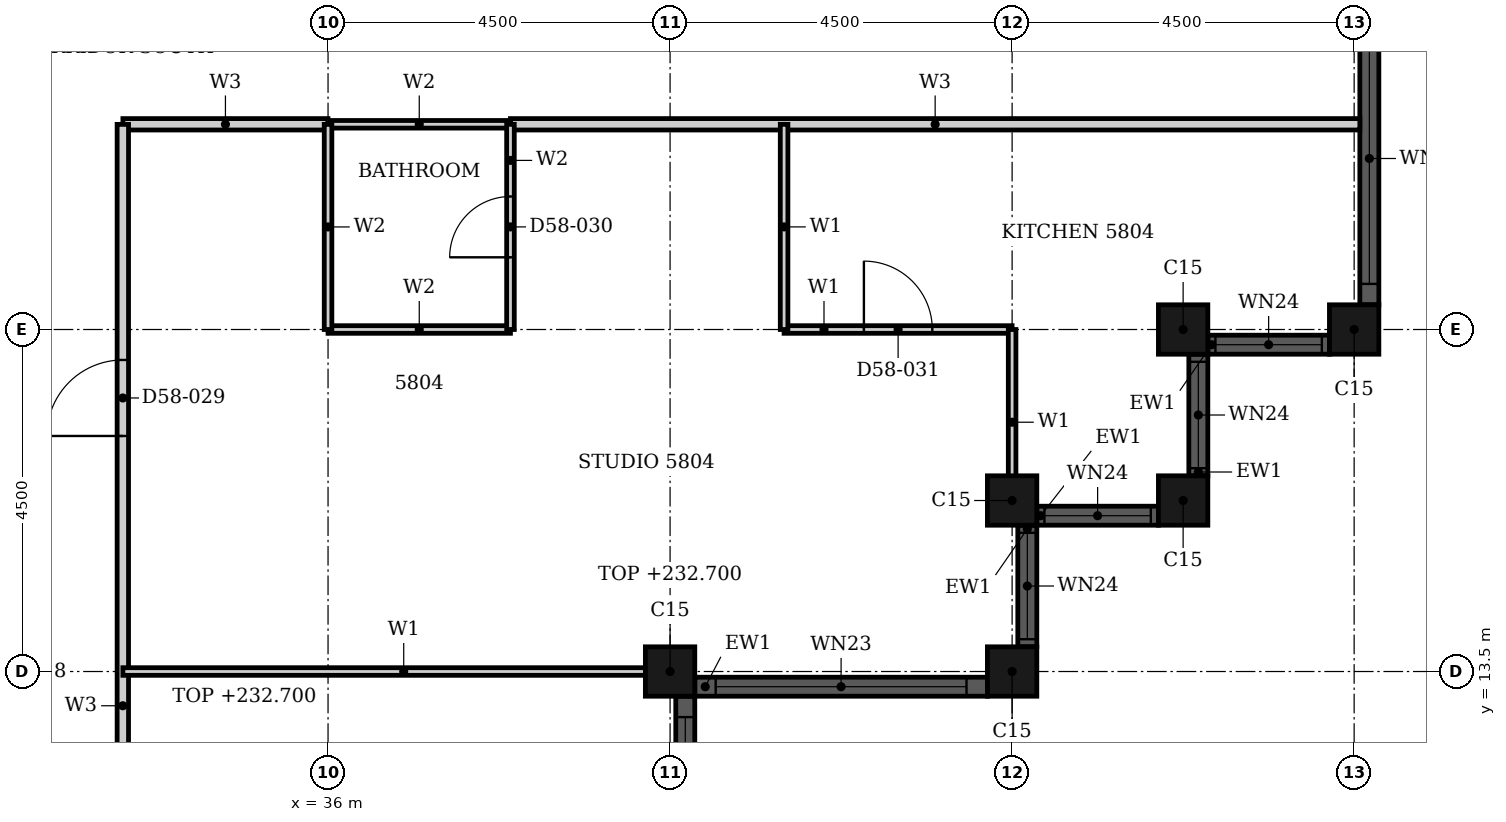
"""IFC4 building model, lengths in metres.
Left out: names, types, materials, properties, quantities, classifications, styles, units other than length and angle.
Written with IfcOpenShell. Run it as: python <this file> out.ifc"""

import sys

from ifc_helpers import new_model, si_unit, direction, frame, frame_2d, origin, origin_2d, place, context, subcontext, project, spatial, rectangle, hollow_rectangle, extrude, element, fill, save


model = new_model("IFC4")
c1 = context("Model", 3, precision=1e-05, world=origin(), true_north=direction((0.0, 1.0)))
c2 = subcontext(c1, "Body", "Model", "MODEL_VIEW")
j1 = project(units=[si_unit("LENGTHUNIT", "METRE"), si_unit("PLANEANGLEUNIT", "RADIAN")], contexts=[c1])
p1 = place(None, origin())
s1 = spatial("IfcSite", under=j1, at=p1, CompositionType="ELEMENT")
p2 = place(p1, origin())
s2 = spatial("IfcBuilding", under=s1, at=p2, CompositionType="ELEMENT")
p3 = place(p2, frame((0.0, 0.0, 229.4)))
s3 = spatial("IfcBuildingStorey", under=s2, at=p3, CompositionType="ELEMENT", Elevation=229.4)
p4 = place(p3, frame((40.5, 13.5, 0.0), z_axis=(0.0, 0.0, 1.0), x_axis=(1.0, 0.0, 0.0)))
e1 = element("IfcColumn", 1, at=p4, inside=s3, PredefinedType="COLUMN", context=c2, shape_type="SweptSolid", body=[
    extrude(hollow_rectangle(XDim=0.65, YDim=0.65, WallThickness=0.021, at=origin_2d()), origin(), (0.0, 0.0, 1.0), 3.3),
])
for number, where, z_axis, x_axis in (
    (2, (45.0, 13.5, 0.0), (0.0, 0.0, 1.0), (1.0, 0.0, 0.0)),
    (3, (45.0, 15.75, 0.0), (0.0, 0.0, 1.0), (1.0, 0.0, 0.0)),
    (4, (47.25, 15.75, 0.0), (0.0, 0.0, 1.0), (1.0, 0.0, 0.0)),
    (5, (47.25, 18.0, 0.0), (0.0, 0.0, 1.0), (1.0, 0.0, 0.0)),
    (6, (49.5, 18.0, 0.0), (0.0, 0.0, 1.0), (1.0, 0.0, 0.0)),
):
    element("IfcColumn", number, at=place(p3, frame(where, z_axis=z_axis, x_axis=x_axis)), inside=s3, PredefinedType="COLUMN", context=c2, shape_type="SweptSolid", body=[
        extrude(hollow_rectangle(XDim=0.65, YDim=0.65, WallThickness=0.021, at=origin_2d()), origin(), (0.0, 0.0, 1.0), 3.7),
    ])
p5 = place(p3, frame((40.825, 13.3, 0.0), z_axis=(0.0, 0.0, 1.0), x_axis=(1.0, 0.0, 0.0)))
e7 = element("IfcWall", 7, at=p5, inside=s3, PredefinedType="SOLIDWALL", context=c2, shape_type="SweptSolid", body=[
    extrude(rectangle(XDim=3.85, YDim=0.25, at=frame_2d((1.925, 0.0))), origin(), (0.0, 0.0, 1.0), 3.7),
])
p6 = place(p5, frame((0.275, 0.0, 0.45)))
e8 = element("IfcOpeningElement", 8, at=p6, cuts=e7, PredefinedType="OPENING", context=c2, shape_type="SweptSolid", body=[
    extrude(rectangle(XDim=3.3, YDim=1.9, at=frame_2d((1.65, 0.95))), frame((0.0, 0.135, 0.0), z_axis=(0.0, -1.0, 0.0), x_axis=(1.0, 0.0, 0.0)), (0.0, 0.0, 1.0), 0.27),
])
p7 = place(p3, frame((45.2, 13.825, 0.0), z_axis=(0.0, 0.0, 1.0), x_axis=(0.0, 1.0, 0.0)))
e9 = element("IfcWall", 9, at=p7, inside=s3, PredefinedType="SOLIDWALL", context=c2, shape_type="SweptSolid", body=[
    extrude(rectangle(XDim=1.6, YDim=0.25, at=frame_2d((0.8, 0.0))), origin(), (0.0, 0.0, 1.0), 3.7),
])
p8 = place(p7, frame((0.1, 0.0, 0.9)))
e10 = element("IfcOpeningElement", 10, at=p8, cuts=e9, PredefinedType="OPENING", context=c2, shape_type="SweptSolid", body=[
    extrude(rectangle(XDim=1.4, YDim=1.75, at=frame_2d((0.7, 0.875))), frame((0.0, 0.135, 0.0), z_axis=(0.0, -1.0, 0.0), x_axis=(1.0, 0.0, 0.0)), (0.0, 0.0, 1.0), 0.27),
])
p9 = place(p3, frame((45.325, 15.55, 0.0), z_axis=(0.0, 0.0, 1.0), x_axis=(1.0, 0.0, 0.0)))
e11 = element("IfcWall", 11, at=p9, inside=s3, PredefinedType="SOLIDWALL", context=c2, shape_type="SweptSolid", body=[
    extrude(rectangle(XDim=1.6, YDim=0.25, at=frame_2d((0.8, 0.0))), origin(), (0.0, 0.0, 1.0), 3.7),
])
p10 = place(p9, frame((0.1, 0.0, 0.9)))
e12 = element("IfcOpeningElement", 12, at=p10, cuts=e11, PredefinedType="OPENING", context=c2, shape_type="SweptSolid", body=[
    extrude(rectangle(XDim=1.4, YDim=1.75, at=frame_2d((0.7, 0.875))), frame((0.0, 0.135, 0.0), z_axis=(0.0, -1.0, 0.0), x_axis=(1.0, 0.0, 0.0)), (0.0, 0.0, 1.0), 0.27),
])
p11 = place(p3, frame((47.45, 16.075, 0.0), z_axis=(0.0, 0.0, 1.0), x_axis=(0.0, 1.0, 0.0)))
e13 = element("IfcWall", 13, at=p11, inside=s3, PredefinedType="SOLIDWALL", context=c2, shape_type="SweptSolid", body=[
    extrude(rectangle(XDim=1.6, YDim=0.25, at=frame_2d((0.8, 0.0))), origin(), (0.0, 0.0, 1.0), 3.7),
])
p12 = place(p11, frame((0.1, 0.0, 0.9)))
e14 = element("IfcOpeningElement", 14, at=p12, cuts=e13, PredefinedType="OPENING", context=c2, shape_type="SweptSolid", body=[
    extrude(rectangle(XDim=1.4, YDim=1.75, at=frame_2d((0.7, 0.875))), frame((0.0, 0.135, 0.0), z_axis=(0.0, -1.0, 0.0), x_axis=(1.0, 0.0, 0.0)), (0.0, 0.0, 1.0), 0.27),
])
p13 = place(p3, frame((47.575, 17.8, 0.0), z_axis=(0.0, 0.0, 1.0), x_axis=(1.0, 0.0, 0.0)))
e15 = element("IfcWall", 15, at=p13, inside=s3, PredefinedType="SOLIDWALL", context=c2, shape_type="SweptSolid", body=[
    extrude(rectangle(XDim=1.6, YDim=0.25, at=frame_2d((0.8, 0.0))), origin(), (0.0, 0.0, 1.0), 3.7),
])
p14 = place(p13, frame((0.1, 0.0, 0.9)))
e16 = element("IfcOpeningElement", 16, at=p14, cuts=e15, PredefinedType="OPENING", context=c2, shape_type="SweptSolid", body=[
    extrude(rectangle(XDim=1.4, YDim=1.75, at=frame_2d((0.7, 0.875))), frame((0.0, 0.135, 0.0), z_axis=(0.0, -1.0, 0.0), x_axis=(1.0, 0.0, 0.0)), (0.0, 0.0, 1.0), 0.27),
])
p15 = place(p3, frame((49.7, 18.325, 0.0), z_axis=(0.0, 0.0, 1.0), x_axis=(0.0, 1.0, 0.0)))
e17 = element("IfcWall", 17, at=p15, inside=s3, PredefinedType="SOLIDWALL", context=c2, shape_type="SweptSolid", body=[
    extrude(rectangle(XDim=8.35, YDim=0.25, at=frame_2d((4.175, 0.0))), origin(), (0.0, 0.0, 1.0), 3.7),
])
p16 = place(p15, frame((0.275, 0.0, 0.45)))
e18 = element("IfcOpeningElement", 18, at=p16, cuts=e17, PredefinedType="OPENING", context=c2, shape_type="SweptSolid", body=[
    extrude(rectangle(XDim=3.3, YDim=2.2, at=frame_2d((1.65, 1.1))), frame((0.0, 0.135, 0.0), z_axis=(0.0, -1.0, 0.0), x_axis=(1.0, 0.0, 0.0)), (0.0, 0.0, 1.0), 0.27),
])
p17 = place(p15, frame((4.775, 0.0, 0.45)))
e19 = element("IfcOpeningElement", 19, at=p17, cuts=e17, PredefinedType="OPENING", context=c2, shape_type="SweptSolid", body=[
    extrude(rectangle(XDim=3.3, YDim=2.2, at=frame_2d((1.65, 1.1))), frame((0.0, 0.135, 0.0), z_axis=(0.0, -1.0, 0.0), x_axis=(1.0, 0.0, 0.0)), (0.0, 0.0, 1.0), 0.27),
])
p18 = place(p3, frame((40.7, 4.825, 0.0), z_axis=(0.0, 0.0, 1.0), x_axis=(0.0, 1.0, 0.0)))
e20 = element("IfcWall", 20, at=p18, inside=s3, PredefinedType="SOLIDWALL", context=c2, shape_type="SweptSolid", body=[
    extrude(rectangle(XDim=8.35, YDim=0.25, at=frame_2d((4.175, 0.0))), origin(), (0.0, 0.0, 1.0), 3.7),
])
p19 = place(p18, frame((0.275, 0.0, 0.45)))
e21 = element("IfcOpeningElement", 21, at=p19, cuts=e20, PredefinedType="OPENING", context=c2, shape_type="SweptSolid", body=[
    extrude(rectangle(XDim=3.3, YDim=2.2, at=frame_2d((1.65, 1.1))), frame((0.0, 0.135, 0.0), z_axis=(0.0, -1.0, 0.0), x_axis=(1.0, 0.0, 0.0)), (0.0, 0.0, 1.0), 0.27),
])
p20 = place(p18, frame((4.775, 0.0, 0.45)))
e22 = element("IfcOpeningElement", 22, at=p20, cuts=e20, PredefinedType="OPENING", context=c2, shape_type="SweptSolid", body=[
    extrude(rectangle(XDim=3.3, YDim=2.2, at=frame_2d((1.65, 1.1))), frame((0.0, 0.135, 0.0), z_axis=(0.0, -1.0, 0.0), x_axis=(1.0, 0.0, 0.0)), (0.0, 0.0, 1.0), 0.27),
])
p21 = place(p3, frame((33.301, 20.7, 0.0), z_axis=(0.0, 0.0, 1.0), x_axis=(1.0, 0.0, 0.0)))
e23 = element("IfcWall", 23, at=p21, inside=s3, PredefinedType="PARTITIONING", context=c2, shape_type="SweptSolid", body=[
    extrude(rectangle(XDim=2.698, YDim=0.15, at=frame_2d((1.349, 0.0))), origin(), (0.0, 0.0, 1.0), 3.3),
])
p22 = place(p3, frame((38.4, 20.7, 0.0), z_axis=(0.0, 0.0, 1.0), x_axis=(1.0, 0.0, 0.0)))
e24 = element("IfcWall", 24, at=p22, inside=s3, PredefinedType="PARTITIONING", context=c2, shape_type="SweptSolid", body=[
    extrude(rectangle(XDim=11.175, YDim=0.15, at=frame_2d((5.587, 0.0))), origin(), (0.0, 0.0, 1.0), 3.3),
])
p23 = place(p3, frame((33.3, 4.5, 0.0), z_axis=(0.0, 0.0, 1.0), x_axis=(0.0, 1.0, 0.0)))
e25 = element("IfcWall", 25, at=p23, inside=s3, PredefinedType="PARTITIONING", context=c2, shape_type="SweptSolid", body=[
    extrude(rectangle(XDim=16.199, YDim=0.15, at=frame_2d((8.1, 0.0))), origin(), (0.0, 0.0, 1.0), 3.3),
])
p24 = place(p23, frame((12.099, 0.0, 0.0)))
e26 = element("IfcOpeningElement", 26, at=p24, cuts=e25, PredefinedType="OPENING", context=c2, shape_type="SweptSolid", body=[
    extrude(rectangle(XDim=1.0, YDim=2.2, at=frame_2d((0.5, 1.1))), frame((0.0, 0.085, 0.0), z_axis=(0.0, -1.0, 0.0), x_axis=(1.0, 0.0, 0.0)), (0.0, 0.0, 1.0), 0.17),
])
p25 = place(p23, frame((4.0, 0.0, 0.0)))
e27 = element("IfcOpeningElement", 27, at=p25, cuts=e25, PredefinedType="OPENING", context=c2, shape_type="SweptSolid", body=[
    extrude(rectangle(XDim=1.0, YDim=2.1, at=frame_2d((0.5, 1.05))), frame((0.0, 0.085, 0.0), z_axis=(0.0, -1.0, 0.0), x_axis=(1.0, 0.0, 0.0)), (0.0, 0.0, 1.0), 0.17),
])
p26 = place(p3, frame((33.301, 13.5, 0.0), z_axis=(0.0, 0.0, 1.0), x_axis=(1.0, 0.0, 0.0)))
e28 = element("IfcWall", 28, at=p26, inside=s3, PredefinedType="PARTITIONING", context=c2, shape_type="SweptSolid", body=[
    extrude(rectangle(XDim=7.389, YDim=0.1, at=frame_2d((3.694, 0.0))), origin(), (0.0, 0.0, 1.0), 2.368),
])
p27 = place(p3, frame((42.0, 18.0, 0.0), z_axis=(0.0, 0.0, 1.0), x_axis=(1.0, 0.0, 0.0)))
e29 = element("IfcWall", 29, at=p27, inside=s3, PredefinedType="PARTITIONING", context=c2, shape_type="SweptSolid", body=[
    extrude(rectangle(XDim=3.0, YDim=0.1, at=frame_2d((1.5, 0.0))), origin(), (0.0, 0.0, 1.0), 3.3),
])
p28 = place(p27, frame((1.05, 0.0, 0.0)))
e30 = element("IfcOpeningElement", 30, at=p28, cuts=e29, PredefinedType="OPENING", context=c2, shape_type="SweptSolid", body=[
    extrude(rectangle(XDim=0.9, YDim=2.1, at=frame_2d((0.45, 1.05))), frame((0.0, 0.06, 0.0), z_axis=(0.0, -1.0, 0.0), x_axis=(1.0, 0.0, 0.0)), (0.0, 0.0, 1.0), 0.12),
])
p29 = place(p3, frame((42.0, 18.0, 0.0), z_axis=(0.0, 0.0, 1.0), x_axis=(0.0, 1.0, 0.0)))
e31 = element("IfcWall", 31, at=p29, inside=s3, PredefinedType="PARTITIONING", context=c2, shape_type="SweptSolid", body=[
    extrude(rectangle(XDim=2.7, YDim=0.1, at=frame_2d((1.35, 0.0))), origin(), (0.0, 0.0, 1.0), 3.3),
])
p30 = place(p3, frame((45.0, 15.56, 0.0), z_axis=(0.0, 0.0, 1.0), x_axis=(0.0, 1.0, 0.0)))
e32 = element("IfcWall", 32, at=p30, inside=s3, PredefinedType="PARTITIONING", context=c2, shape_type="SweptSolid", body=[
    extrude(rectangle(XDim=2.44, YDim=0.1, at=frame_2d((1.22, 0.0))), origin(), (0.0, 0.0, 1.0), 3.3),
])
for number, where, z_axis, x_axis in (
    (33, (36.0, 18.0, 0.0), (0.0, 0.0, 1.0), (1.0, 0.0, 0.0)),
    (34, (36.0, 20.7, 0.0), (0.0, 0.0, 1.0), (1.0, 0.0, 0.0)),
):
    element("IfcWall", number, at=place(p3, frame(where, z_axis=z_axis, x_axis=x_axis)), inside=s3, PredefinedType="PARTITIONING", context=c2, shape_type="SweptSolid", body=[
        extrude(rectangle(XDim=2.4, YDim=0.1, at=frame_2d((1.2, 0.0))), origin(), (0.0, 0.0, 1.0), 3.3),
    ])
p31 = place(p3, frame((36.0, 18.0, 0.0), z_axis=(0.0, 0.0, 1.0), x_axis=(0.0, 1.0, 0.0)))
e35 = element("IfcWall", 35, at=p31, inside=s3, PredefinedType="PARTITIONING", context=c2, shape_type="SweptSolid", body=[
    extrude(rectangle(XDim=2.699, YDim=0.1, at=frame_2d((1.35, 0.0))), origin(), (0.0, 0.0, 1.0), 3.3),
])
p32 = place(p3, frame((38.4, 18.0, 0.0), z_axis=(0.0, 0.0, 1.0), x_axis=(0.0, 1.0, 0.0)))
e36 = element("IfcWall", 36, at=p32, inside=s3, PredefinedType="PARTITIONING", context=c2, shape_type="SweptSolid", body=[
    extrude(rectangle(XDim=2.7, YDim=0.1, at=frame_2d((1.35, 0.0))), origin(), (0.0, 0.0, 1.0), 3.3),
])
p33 = place(p32, frame((0.95, 0.0, 0.0)))
e37 = element("IfcOpeningElement", 37, at=p33, cuts=e36, PredefinedType="OPENING", context=c2, shape_type="SweptSolid", body=[
    extrude(rectangle(XDim=0.8, YDim=2.1, at=frame_2d((0.4, 1.05))), frame((0.0, 0.06, 0.0), z_axis=(0.0, -1.0, 0.0), x_axis=(1.0, 0.0, 0.0)), (0.0, 0.0, 1.0), 0.12),
])
p34 = place(p6, origin())
e38 = element("IfcWindow", 38, at=p34, inside=s3, PartitioningType="SINGLE_PANEL", PredefinedType="WINDOW", context=c2, shape_type="SweptSolid", body=[
    extrude(rectangle(XDim=3.3, YDim=1.9, at=frame_2d((1.65, 0.95))), frame((0.0, 0.03, 0.0), z_axis=(0.0, -1.0, 0.0), x_axis=(1.0, 0.0, 0.0)), (0.0, 0.0, 1.0), 0.06),
])
fill(e8, e38)
p35 = place(p8, origin())
e39 = element("IfcWindow", 39, at=p35, inside=s3, PartitioningType="SINGLE_PANEL", PredefinedType="WINDOW", context=c2, shape_type="SweptSolid", body=[
    extrude(rectangle(XDim=1.4, YDim=1.75, at=frame_2d((0.7, 0.875))), frame((0.0, 0.03, 0.0), z_axis=(0.0, -1.0, 0.0), x_axis=(1.0, 0.0, 0.0)), (0.0, 0.0, 1.0), 0.06),
])
fill(e10, e39)
p36 = place(p10, origin())
e40 = element("IfcWindow", 40, at=p36, inside=s3, PartitioningType="SINGLE_PANEL", PredefinedType="WINDOW", context=c2, shape_type="SweptSolid", body=[
    extrude(rectangle(XDim=1.4, YDim=1.75, at=frame_2d((0.7, 0.875))), frame((0.0, 0.03, 0.0), z_axis=(0.0, -1.0, 0.0), x_axis=(1.0, 0.0, 0.0)), (0.0, 0.0, 1.0), 0.06),
])
fill(e12, e40)
p37 = place(p12, origin())
e41 = element("IfcWindow", 41, at=p37, inside=s3, PartitioningType="SINGLE_PANEL", PredefinedType="WINDOW", context=c2, shape_type="SweptSolid", body=[
    extrude(rectangle(XDim=1.4, YDim=1.75, at=frame_2d((0.7, 0.875))), frame((0.0, 0.03, 0.0), z_axis=(0.0, -1.0, 0.0), x_axis=(1.0, 0.0, 0.0)), (0.0, 0.0, 1.0), 0.06),
])
fill(e14, e41)
p38 = place(p14, origin())
e42 = element("IfcWindow", 42, at=p38, inside=s3, PartitioningType="SINGLE_PANEL", PredefinedType="WINDOW", context=c2, shape_type="SweptSolid", body=[
    extrude(rectangle(XDim=1.4, YDim=1.75, at=frame_2d((0.7, 0.875))), frame((0.0, 0.03, 0.0), z_axis=(0.0, -1.0, 0.0), x_axis=(1.0, 0.0, 0.0)), (0.0, 0.0, 1.0), 0.06),
])
fill(e16, e42)
p39 = place(p16, origin())
e43 = element("IfcWindow", 43, at=p39, inside=s3, PartitioningType="SINGLE_PANEL", PredefinedType="WINDOW", context=c2, shape_type="SweptSolid", body=[
    extrude(rectangle(XDim=3.3, YDim=2.2, at=frame_2d((1.65, 1.1))), frame((0.0, 0.03, 0.0), z_axis=(0.0, -1.0, 0.0), x_axis=(1.0, 0.0, 0.0)), (0.0, 0.0, 1.0), 0.06),
])
fill(e18, e43)
p40 = place(p20, origin())
e44 = element("IfcWindow", 44, at=p40, inside=s3, PartitioningType="SINGLE_PANEL", PredefinedType="WINDOW", context=c2, shape_type="SweptSolid", body=[
    extrude(rectangle(XDim=3.3, YDim=2.2, at=frame_2d((1.65, 1.1))), frame((0.0, 0.03, 0.0), z_axis=(0.0, -1.0, 0.0), x_axis=(1.0, 0.0, 0.0)), (0.0, 0.0, 1.0), 0.06),
])
fill(e22, e44)
p41 = place(p24, origin())
e45 = element("IfcDoor", 45, at=p41, inside=s3, OperationType="SINGLE_SWING_LEFT", PredefinedType="DOOR", context=c2, shape_type="SweptSolid", body=[
    extrude(rectangle(XDim=1.0, YDim=2.2, at=frame_2d((0.5, 1.1))), frame((0.0, 0.025, 0.0), z_axis=(0.0, -1.0, 0.0), x_axis=(1.0, 0.0, 0.0)), (0.0, 0.0, 1.0), 0.05),
])
fill(e26, e45)
p42 = place(p33, origin())
e46 = element("IfcDoor", 46, at=p42, inside=s3, OperationType="SINGLE_SWING_RIGHT", PredefinedType="DOOR", context=c2, shape_type="SweptSolid", body=[
    extrude(rectangle(XDim=0.8, YDim=2.1, at=frame_2d((0.4, 1.05))), frame((0.0, 0.025, 0.0), z_axis=(0.0, -1.0, 0.0), x_axis=(1.0, 0.0, 0.0)), (0.0, 0.0, 1.0), 0.05),
])
fill(e37, e46)
p43 = place(p28, origin())
e47 = element("IfcDoor", 47, at=p43, inside=s3, OperationType="SINGLE_SWING_RIGHT", PredefinedType="DOOR", context=c2, shape_type="SweptSolid", body=[
    extrude(rectangle(XDim=0.9, YDim=2.1, at=frame_2d((0.45, 1.05))), frame((0.0, 0.025, 0.0), z_axis=(0.0, -1.0, 0.0), x_axis=(1.0, 0.0, 0.0)), (0.0, 0.0, 1.0), 0.05),
])
fill(e30, e47)
save(model, sys.argv[1])
